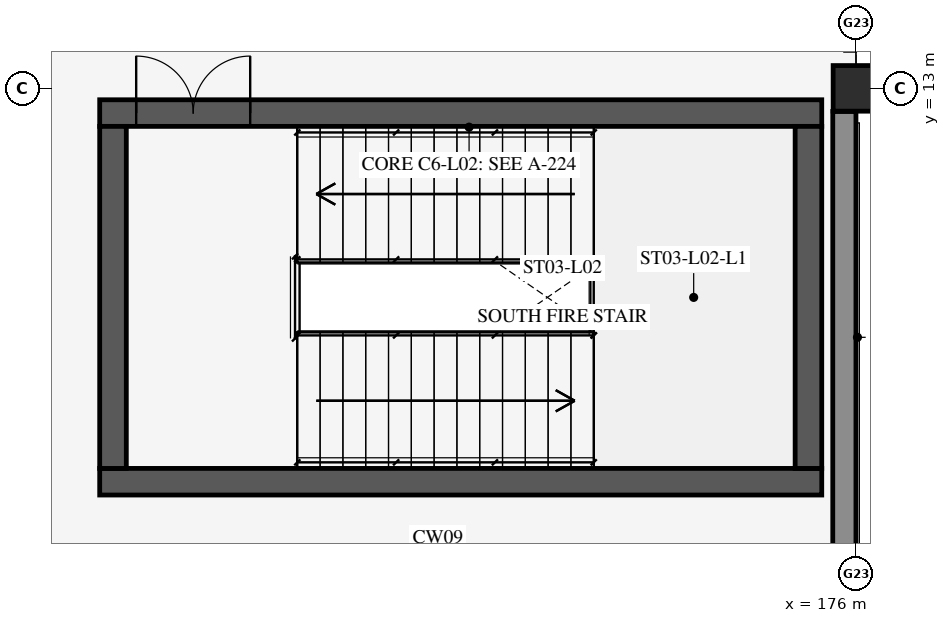
"""IFC4 building model, lengths in metres.
Left out: names, types, materials, properties, quantities, classifications, styles, units other than length and angle.
Written with IfcOpenShell. Run it as: python <this file> out.ifc"""

import sys

from ifc_helpers import new_model, si_unit, direction, frame, frame_2d, origin, origin_2d, place, context, subcontext, project, spatial, rectangle, circle, extrude, element, fill, save


model = new_model("IFC4")
c1 = context("Model", 3, precision=1e-05, world=origin(), true_north=direction((0.0, 1.0)))
c2 = subcontext(c1, "Body", "Model", "MODEL_VIEW")
j1 = project(units=[si_unit("LENGTHUNIT", "METRE"), si_unit("PLANEANGLEUNIT", "RADIAN")], contexts=[c1])
p1 = place(None, origin())
s1 = spatial("IfcSite", under=j1, at=p1, CompositionType="ELEMENT")
p2 = place(p1, origin())
s2 = spatial("IfcBuilding", under=s1, at=p2, CompositionType="ELEMENT")
p3 = place(p2, frame((0.0, 0.0, 10.2)))
s3 = spatial("IfcBuildingStorey", under=s2, at=p3, CompositionType="ELEMENT", Elevation=10.2)
p4 = place(p3, frame((166.05, 7.825, 0.0), z_axis=(0.0, 0.0, 1.0), x_axis=(1.0, 0.0, 0.0)))
e1 = element("IfcWall", 1, at=p4, inside=s3, PredefinedType="SHEAR", context=c2, shape_type="SweptSolid", body=[
    extrude(rectangle(XDim=9.5, YDim=0.35, at=frame_2d((4.75, 0.0))), origin(), (0.0, 0.0, 1.0), 4.38),
])
p5 = place(p3, frame((166.05, 12.675, 0.0), z_axis=(0.0, 0.0, 1.0), x_axis=(1.0, 0.0, 0.0)))
e2 = element("IfcWall", 2, at=p5, inside=s3, PredefinedType="SHEAR", context=c2, shape_type="SweptSolid", body=[
    extrude(rectangle(XDim=9.5, YDim=0.35, at=frame_2d((4.75, 0.0))), origin(), (0.0, 0.0, 1.0), 4.38),
])
p6 = place(p5, frame((0.48, 0.0, 0.0)))
e3 = element("IfcOpeningElement", 3, at=p6, cuts=e2, PredefinedType="OPENING", context=c2, shape_type="SweptSolid", body=[
    extrude(rectangle(XDim=1.5, YDim=2.3, at=frame_2d((0.75, 1.15))), frame((0.0, 0.187, 0.0), z_axis=(0.0, -1.0, 0.0), x_axis=(1.0, 0.0, 0.0)), (0.0, 0.0, 1.0), 0.374),
])
for number, where, z_axis, x_axis in (
    (4, (166.225, 8.0, 0.0), (0.0, 0.0, 1.0), (0.0, 1.0, 0.0)),
    (5, (175.375, 8.0, 0.0), (0.0, 0.0, 1.0), (0.0, 1.0, 0.0)),
):
    element("IfcWall", number, at=place(p3, frame(where, z_axis=z_axis, x_axis=x_axis)), inside=s3, PredefinedType="SHEAR", context=c2, shape_type="SweptSolid", body=[
        extrude(rectangle(XDim=4.5, YDim=0.35, at=frame_2d((2.25, 0.0))), origin(), (0.0, 0.0, 1.0), 4.38),
    ])
p7 = place(p3, frame((176.0, 13.0, 0.0), z_axis=(0.0, 0.0, 1.0), x_axis=(1.0, 0.0, 0.0)))
e6 = element("IfcColumn", 6, at=p7, inside=s3, PredefinedType="COLUMN", context=c2, shape_type="SweptSolid", body=[
    extrude(circle(Radius=0.3, at=origin_2d()), origin(), (0.0, 0.0, 1.0), 4.6),
])
p8 = place(p3, frame((175.847, 6.754, 0.0), z_axis=(0.0, 0.0, 1.0), x_axis=(0.0, 1.0, 0.0)))
e7 = element("IfcWall", 7, at=p8, inside=s3, PredefinedType="SOLIDWALL", context=c2, shape_type="SweptSolid", body=[
    extrude(rectangle(XDim=5.942, YDim=0.305, at=frame_2d((2.971, 0.0))), origin(), (0.0, 0.0, 1.0), 3.814),
])
p9 = place(p6, frame((1.5, 0.0, 0.0), z_axis=(0.0, 0.0, 1.0), x_axis=(-1.0, 0.0, 0.0)))
e8 = element("IfcDoor", 8, at=p9, inside=s3, OperationType="DOUBLE_DOOR_SINGLE_SWING", PredefinedType="DOOR", context=c2, shape_type="SweptSolid", body=[
    extrude(rectangle(XDim=1.5, YDim=2.3, at=frame_2d((0.75, 1.15))), frame((0.0, 0.025, 0.0), z_axis=(0.0, -1.0, 0.0), x_axis=(1.0, 0.0, 0.0)), (0.0, 0.0, 1.0), 0.05),
])
fill(e3, e8)
save(model, sys.argv[1])
